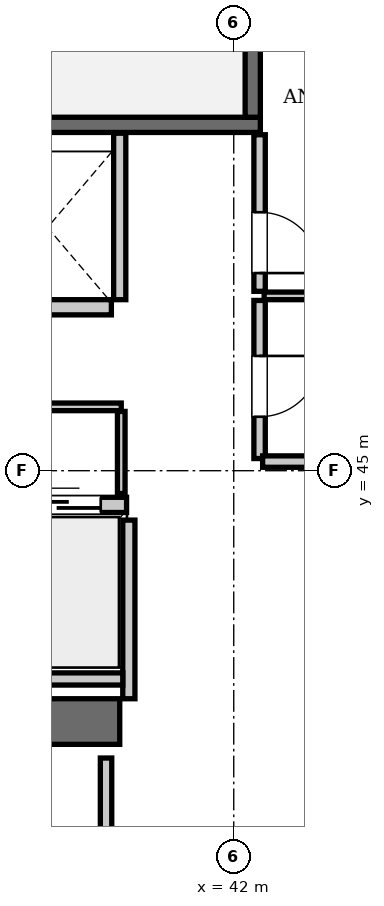
"""IFC4 building model, lengths in metres.
Left out: names, types, materials, properties, quantities, classifications, styles, units other than length and angle.
Written with IfcOpenShell. Run it as: python <this file> out.ifc"""

import sys

from ifc_helpers import new_model, si_unit, direction, frame, frame_2d, origin, place, context, subcontext, project, spatial, rectangle, extrude, element, fill, save


model = new_model("IFC4")
c1 = context("Model", 3, precision=1e-05, world=origin(), true_north=direction((0.0, 1.0)))
c2 = subcontext(c1, "Body", "Model", "MODEL_VIEW")
j1 = project(units=[si_unit("LENGTHUNIT", "METRE"), si_unit("PLANEANGLEUNIT", "RADIAN")], contexts=[c1])
p1 = place(None, origin())
s1 = spatial("IfcSite", under=j1, at=p1, CompositionType="ELEMENT")
p2 = place(p1, origin())
s2 = spatial("IfcBuilding", under=s1, at=p2, CompositionType="ELEMENT")
p3 = place(p2, frame((0.0, 0.0, 304.85)))
s3 = spatial("IfcBuildingStorey", under=s2, at=p3, CompositionType="ELEMENT", Elevation=304.85)
p4 = place(p3, frame((35.1, 41.7, 0.0), z_axis=(0.0, 0.0, 1.0), x_axis=(1.0, 0.0, 0.0)))
e1 = element("IfcWall", 1, at=p4, inside=s3, PredefinedType="SHEAR", context=c2, shape_type="SweptSolid", body=[
    extrude(rectangle(XDim=5.4, YDim=0.6, at=frame_2d((2.7, 0.0))), origin(), (0.0, 0.0, 1.0), 3.85),
])
p5 = place(p3, frame((33.25, 49.55, 0.0), z_axis=(0.0, 0.0, 1.0), x_axis=(1.0, 0.0, 0.0)))
e2 = element("IfcWall", 2, at=p5, inside=s3, PredefinedType="SOLIDWALL", context=c2, shape_type="SweptSolid", body=[
    extrude(rectangle(XDim=9.1, YDim=0.2, at=frame_2d((4.55, 0.0))), origin(), (0.0, 0.0, 1.0), 3.61),
])
p6 = place(p3, frame((42.25, 49.65, 0.0), z_axis=(0.0, 0.0, 1.0), x_axis=(0.0, 1.0, 0.0)))
e3 = element("IfcWall", 3, at=p6, inside=s3, PredefinedType="SOLIDWALL", context=c2, shape_type="SweptSolid", body=[
    extrude(rectangle(XDim=3.75, YDim=0.2, at=frame_2d((1.875, 0.0))), origin(), (0.0, 0.0, 1.0), 3.61),
])
p7 = place(p3, frame((38.91, 44.55, 0.0), z_axis=(0.0, 0.0, 1.0), x_axis=(1.0, 0.0, 0.0)))
e4 = element("IfcWall", 4, at=p7, inside=s3, PredefinedType="SOLIDWALL", context=c2, shape_type="SweptSolid", body=[
    extrude(rectangle(XDim=1.68, YDim=0.2, at=frame_2d((0.84, 0.0))), origin(), (0.0, 0.0, 1.0), 3.61),
])
p8 = place(p7, frame((0.34, 0.0, 0.0)))
e5 = element("IfcOpeningElement", 5, at=p8, cuts=e4, PredefinedType="OPENING", context=c2, shape_type="SweptSolid", body=[
    extrude(rectangle(XDim=1.0, YDim=2.15, at=frame_2d((0.5, 1.075))), frame((0.0, 0.11, 0.0), z_axis=(0.0, -1.0, 0.0), x_axis=(1.0, 0.0, 0.0)), (0.0, 0.0, 1.0), 0.22),
])
p9 = place(p3, frame((38.71, 47.15, 0.0), z_axis=(0.0, 0.0, 1.0), x_axis=(1.0, 0.0, 0.0)))
e6 = element("IfcWall", 6, at=p9, inside=s3, PredefinedType="SOLIDWALL", context=c2, shape_type="SweptSolid", body=[
    extrude(rectangle(XDim=1.68, YDim=0.2, at=frame_2d((0.84, 0.0))), origin(), (0.0, 0.0, 1.0), 3.61),
])
p10 = place(p3, frame((40.62, 42.0, 0.0), z_axis=(0.0, 0.0, 1.0), x_axis=(0.0, 1.0, 0.0)))
e7 = element("IfcWall", 7, at=p10, inside=s3, PredefinedType="SOLIDWALL", context=c2, shape_type="SweptSolid", body=[
    extrude(rectangle(XDim=2.35, YDim=0.16, at=frame_2d((1.175, 0.0))), origin(), (0.0, 0.0, 1.0), 3.61),
])
p11 = place(p3, frame((35.52, 42.26, 0.0), z_axis=(0.0, 0.0, 1.0), x_axis=(1.0, 0.0, 0.0)))
e8 = element("IfcWall", 8, at=p11, inside=s3, PredefinedType="SOLIDWALL", context=c2, shape_type="SweptSolid", body=[
    extrude(rectangle(XDim=5.02, YDim=0.16, at=frame_2d((2.51, 0.0))), origin(), (0.0, 0.0, 1.0), 3.61),
])
p12 = place(p3, frame((40.5, 47.25, 0.0), z_axis=(0.0, 0.0, 1.0), x_axis=(0.0, 1.0, 0.0)))
e9 = element("IfcWall", 9, at=p12, inside=s3, PredefinedType="SOLIDWALL", context=c2, shape_type="SweptSolid", body=[
    extrude(rectangle(XDim=2.19, YDim=0.16, at=frame_2d((1.095, 0.0))), origin(), (0.0, 0.0, 1.0), 3.61),
])
p13 = place(p3, frame((35.58, 45.84, 0.0), z_axis=(0.0, 0.0, 1.0), x_axis=(1.0, 0.0, 0.0)))
e10 = element("IfcWall", 10, at=p13, inside=s3, PredefinedType="PARTITIONING", context=c2, shape_type="SweptSolid", body=[
    extrude(rectangle(XDim=4.94, YDim=0.1, at=frame_2d((2.47, 0.0))), origin(), (0.0, 0.0, 1.0), 3.61),
])
p14 = place(p13, frame((1.8, 0.0, 0.0)))
e11 = element("IfcOpeningElement", 11, at=p14, cuts=e10, PredefinedType="OPENING", context=c2, shape_type="SweptSolid", body=[
    extrude(rectangle(XDim=0.8, YDim=2.05, at=frame_2d((0.4, 1.025))), frame((0.0, 0.06, 0.0), z_axis=(0.0, -1.0, 0.0), x_axis=(1.0, 0.0, 0.0)), (0.0, 0.0, 1.0), 0.12),
])
p15 = place(p3, frame((40.52, 44.7, 0.0), z_axis=(0.0, 0.0, 1.0), x_axis=(0.0, 1.0, 0.0)))
e12 = element("IfcWall", 12, at=p15, inside=s3, PredefinedType="PARTITIONING", context=c2, shape_type="SweptSolid", body=[
    extrude(rectangle(XDim=1.08, YDim=0.1, at=frame_2d((0.54, 0.0))), origin(), (0.0, 0.0, 1.0), 3.61),
])
p16 = place(p3, frame((42.34, 45.16, 0.0), z_axis=(0.0, 0.0, 1.0), x_axis=(0.0, 1.0, 0.0)))
e13 = element("IfcWall", 13, at=p16, inside=s3, PredefinedType="PARTITIONING", context=c2, shape_type="SweptSolid", body=[
    extrude(rectangle(XDim=2.08, YDim=0.15, at=frame_2d((1.04, 0.0))), origin(), (0.0, 0.0, 1.0), 3.61),
])
p17 = place(p16, frame((0.55, 0.0, 0.0)))
e14 = element("IfcOpeningElement", 14, at=p17, cuts=e13, PredefinedType="OPENING", context=c2, shape_type="SweptSolid", body=[
    extrude(rectangle(XDim=0.8, YDim=2.05, at=frame_2d((0.4, 1.025))), frame((0.0, 0.085, 0.0), z_axis=(0.0, -1.0, 0.0), x_axis=(1.0, 0.0, 0.0)), (0.0, 0.0, 1.0), 0.17),
])
p18 = place(p3, frame((42.34, 47.36, 0.0), z_axis=(0.0, 0.0, 1.0), x_axis=(0.0, 1.0, 0.0)))
e15 = element("IfcWall", 15, at=p18, inside=s3, PredefinedType="PARTITIONING", context=c2, shape_type="SweptSolid", body=[
    extrude(rectangle(XDim=2.06, YDim=0.15, at=frame_2d((1.03, 0.0))), origin(), (0.0, 0.0, 1.0), 3.61),
])
p19 = place(p18, frame((0.24, 0.0, 0.0)))
e16 = element("IfcOpeningElement", 16, at=p19, cuts=e15, PredefinedType="OPENING", context=c2, shape_type="SweptSolid", body=[
    extrude(rectangle(XDim=0.8, YDim=2.05, at=frame_2d((0.4, 1.025))), frame((0.0, 0.085, 0.0), z_axis=(0.0, -1.0, 0.0), x_axis=(1.0, 0.0, 0.0)), (0.0, 0.0, 1.0), 0.17),
])
p20 = place(p3, frame((42.4, 47.3, 0.0), z_axis=(0.0, 0.0, 1.0), x_axis=(1.0, 0.0, 0.0)))
e17 = element("IfcWall", 17, at=p20, inside=s3, PredefinedType="PARTITIONING", context=c2, shape_type="SweptSolid", body=[
    extrude(rectangle(XDim=3.1, YDim=0.1, at=frame_2d((1.55, 0.0))), origin(), (0.0, 0.0, 1.0), 3.61),
])
p21 = place(p3, frame((42.38, 45.12, 0.0), z_axis=(0.0, 0.0, 1.0), x_axis=(1.0, 0.0, 0.0)))
e18 = element("IfcWall", 18, at=p21, inside=s3, PredefinedType="PARTITIONING", context=c2, shape_type="SweptSolid", body=[
    extrude(rectangle(XDim=3.14, YDim=0.15, at=frame_2d((1.57, 0.0))), origin(), (0.0, 0.0, 1.0), 3.61),
])
p22 = place(p3, frame((40.32, 38.38, 0.0), z_axis=(0.0, 0.0, 1.0), x_axis=(0.0, 1.0, 0.0)))
e19 = element("IfcWall", 19, at=p22, inside=s3, PredefinedType="PARTITIONING", context=c2, shape_type="SweptSolid", body=[
    extrude(rectangle(XDim=2.84, YDim=0.15, at=frame_2d((1.42, 0.0))), origin(), (0.0, 0.0, 1.0), 3.61),
])
p23 = place(p8, origin())
e20 = element("IfcDoor", 20, at=p23, inside=s3, OperationType="SLIDING_TO_LEFT", PredefinedType="DOOR", context=c2, shape_type="SweptSolid", body=[
    extrude(rectangle(XDim=1.0, YDim=2.15, at=frame_2d((0.5, 1.075))), frame((0.0, 0.025, 0.0), z_axis=(0.0, -1.0, 0.0), x_axis=(1.0, 0.0, 0.0)), (0.0, 0.0, 1.0), 0.05),
])
fill(e5, e20)
p24 = place(p17, frame((0.8, 0.0, 0.0), z_axis=(0.0, 0.0, 1.0), x_axis=(-1.0, 0.0, 0.0)))
e21 = element("IfcDoor", 21, at=p24, inside=s3, OperationType="SINGLE_SWING_LEFT", PredefinedType="DOOR", context=c2, shape_type="SweptSolid", body=[
    extrude(rectangle(XDim=0.8, YDim=2.05, at=frame_2d((0.4, 1.025))), frame((0.0, 0.025, 0.0), z_axis=(0.0, -1.0, 0.0), x_axis=(1.0, 0.0, 0.0)), (0.0, 0.0, 1.0), 0.05),
])
fill(e14, e21)
p25 = place(p19, frame((0.8, 0.0, 0.0), z_axis=(0.0, 0.0, 1.0), x_axis=(-1.0, 0.0, 0.0)))
e22 = element("IfcDoor", 22, at=p25, inside=s3, OperationType="SINGLE_SWING_RIGHT", PredefinedType="DOOR", context=c2, shape_type="SweptSolid", body=[
    extrude(rectangle(XDim=0.8, YDim=2.05, at=frame_2d((0.4, 1.025))), frame((0.0, 0.025, 0.0), z_axis=(0.0, -1.0, 0.0), x_axis=(1.0, 0.0, 0.0)), (0.0, 0.0, 1.0), 0.05),
])
fill(e16, e22)
save(model, sys.argv[1])
